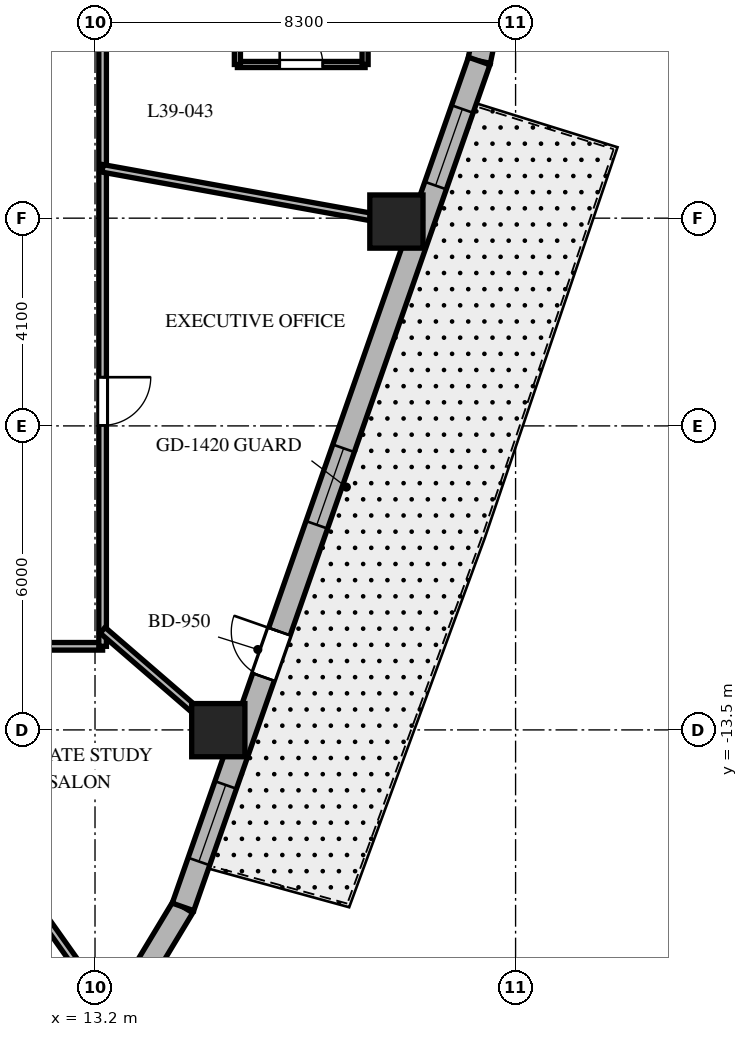
"""IFC4 building model, lengths in metres.
Left out: names, types, materials, properties, quantities, classifications, styles, units other than length and angle.
Written with IfcOpenShell. Run it as: python <this file> out.ifc"""

import sys

from ifc_helpers import new_model, si_unit, direction, frame, frame_2d, origin, origin_2d, place, context, subcontext, project, spatial, rectangle, extrude, element, fill, save


model = new_model("IFC4")
c1 = context("Model", 3, precision=1e-05, world=origin(), true_north=direction((0.0, 1.0)))
c2 = subcontext(c1, "Body", "Model", "MODEL_VIEW")
j1 = project(units=[si_unit("LENGTHUNIT", "METRE"), si_unit("PLANEANGLEUNIT", "RADIAN")], contexts=[c1])
p1 = place(None, origin())
s1 = spatial("IfcSite", under=j1, at=p1, CompositionType="ELEMENT")
p2 = place(p1, origin())
s2 = spatial("IfcBuilding", under=s1, at=p2, CompositionType="ELEMENT")
p3 = place(p2, frame((0.0, 0.0, 159.1)))
s3 = spatial("IfcBuildingStorey", under=s2, at=p3, CompositionType="ELEMENT", Elevation=159.1)
for number, where, z_axis, x_axis in (
    (1, (15.633, -13.505, 0.0), (0.0, 0.0, 1.0), (1.0, 0.0, 0.0)),
    (2, (19.148, -3.467, 0.0), (0.0, 0.0, 1.0), (1.0, 0.0, 0.0)),
):
    element("IfcColumn", number, at=place(p3, frame(where, z_axis=z_axis, x_axis=x_axis)), inside=s3, PredefinedType="COLUMN", context=c2, shape_type="SweptSolid", body=[
        extrude(rectangle(XDim=1.05, YDim=1.05, at=origin_2d()), origin(), (0.0, 0.0, 1.0), 3.7),
    ])
p4 = place(p3, frame((14.214, -18.192, 0.0), z_axis=(0.0, 0.0, 1.0), x_axis=(0.516340945502, 0.856383108193, 0.0)))
e3 = element("IfcWall", 3, at=p4, inside=s3, PredefinedType="SOLIDWALL", context=c2, shape_type="SweptSolid", body=[
    extrude(rectangle(XDim=1.4, YDim=0.45, at=frame_2d((0.7, 0.0))), origin(), (0.0, 0.0, 1.0), 3.4),
])
p5 = place(p3, frame((20.782, -0.298, 0.0), z_axis=(0.0, 0.0, 1.0), x_axis=(0.202570068411, 0.979267771033, 0.0)))
e4 = element("IfcWall", 4, at=p5, inside=s3, PredefinedType="SOLIDWALL", context=c2, shape_type="SweptSolid", body=[
    extrude(rectangle(XDim=0.909, YDim=0.45, at=frame_2d((0.454, 0.0))), origin(), (0.0, 0.0, 1.0), 3.4),
])
p6 = place(p3, frame((14.937, -16.993, 0.0), z_axis=(0.0, 0.0, 1.0), x_axis=(0.330431575061, 0.943829949834, 0.0)))
e5 = element("IfcWall", 5, at=p6, inside=s3, PredefinedType="SOLIDWALL", context=c2, shape_type="SweptSolid", body=[
    extrude(rectangle(XDim=17.689, YDim=0.45, at=frame_2d((8.844, 0.0))), origin(), (0.0, 0.0, 1.0), 3.4),
])
p7 = place(p6, frame((4.807, 0.0, 0.0)))
e6 = element("IfcOpeningElement", 6, at=p7, cuts=e5, PredefinedType="OPENING", context=c2, shape_type="SweptSolid", body=[
    extrude(rectangle(XDim=0.95, YDim=2.15, at=frame_2d((0.475, 1.075))), frame((0.0, 0.235, 0.0), z_axis=(0.0, -1.0, 0.0), x_axis=(1.0, 0.0, 0.0)), (0.0, 0.0, 1.0), 0.47),
])
p8 = place(p6, frame((0.95, 0.0, 0.8)))
e7 = element("IfcOpeningElement", 7, at=p8, cuts=e5, PredefinedType="OPENING", context=c2, shape_type="SweptSolid", body=[
    extrude(rectangle(XDim=1.6, YDim=1.75, at=frame_2d((0.8, 0.875))), frame((0.0, 0.235, 0.0), z_axis=(0.0, -1.0, 0.0), x_axis=(1.0, 0.0, 0.0)), (0.0, 0.0, 1.0), 0.47),
])
p9 = place(p6, frame((7.99, 0.0, 0.8)))
e8 = element("IfcOpeningElement", 8, at=p9, cuts=e5, PredefinedType="OPENING", context=c2, shape_type="SweptSolid", body=[
    extrude(rectangle(XDim=1.6, YDim=1.75, at=frame_2d((0.8, 0.875))), frame((0.0, 0.235, 0.0), z_axis=(0.0, -1.0, 0.0), x_axis=(1.0, 0.0, 0.0)), (0.0, 0.0, 1.0), 0.47),
])
p10 = place(p6, frame((15.084, 0.0, 0.8)))
e9 = element("IfcOpeningElement", 9, at=p10, cuts=e5, PredefinedType="OPENING", context=c2, shape_type="SweptSolid", body=[
    extrude(rectangle(XDim=1.6, YDim=1.75, at=frame_2d((0.8, 0.875))), frame((0.0, 0.235, 0.0), z_axis=(0.0, -1.0, 0.0), x_axis=(1.0, 0.0, 0.0)), (0.0, 0.0, 1.0), 0.47),
])
p11 = place(p3, frame((13.35, -11.85, 0.0), z_axis=(0.0, 0.0, 1.0), x_axis=(-1.0, 0.0, 0.0)))
e10 = element("IfcWall", 10, at=p11, inside=s3, PredefinedType="PARTITIONING", context=c2, shape_type="SweptSolid", body=[
    extrude(rectangle(XDim=26.7, YDim=0.15, at=frame_2d((13.35, 0.0))), origin(), (0.0, 0.0, 1.0), 2.84),
])
p12 = place(p11, frame((20.682, 0.0, 0.0)))
e11 = element("IfcOpeningElement", 11, at=p12, cuts=e10, PredefinedType="OPENING", context=c2, shape_type="SweptSolid", body=[
    extrude(rectangle(XDim=0.95, YDim=2.03, at=frame_2d((0.475, 1.015))), frame((0.0, 0.085, 0.0), z_axis=(0.0, -1.0, 0.0), x_axis=(1.0, 0.0, 0.0)), (0.0, 0.0, 1.0), 0.17),
])
p13 = place(p11, frame((14.708, 0.0, 0.0)))
e12 = element("IfcOpeningElement", 12, at=p13, cuts=e10, PredefinedType="OPENING", context=c2, shape_type="SweptSolid", body=[
    extrude(rectangle(XDim=0.95, YDim=2.03, at=frame_2d((0.475, 1.015))), frame((0.0, 0.085, 0.0), z_axis=(0.0, -1.0, 0.0), x_axis=(1.0, 0.0, 0.0)), (0.0, 0.0, 1.0), 0.17),
])
p14 = place(p11, frame((10.553, 0.0, 0.0)))
e13 = element("IfcOpeningElement", 13, at=p14, cuts=e10, PredefinedType="OPENING", context=c2, shape_type="SweptSolid", body=[
    extrude(rectangle(XDim=0.95, YDim=2.03, at=frame_2d((0.475, 1.015))), frame((0.0, 0.085, 0.0), z_axis=(0.0, -1.0, 0.0), x_axis=(1.0, 0.0, 0.0)), (0.0, 0.0, 1.0), 0.17),
])
p15 = place(p11, frame((6.353, 0.0, 0.0)))
e14 = element("IfcOpeningElement", 14, at=p15, cuts=e10, PredefinedType="OPENING", context=c2, shape_type="SweptSolid", body=[
    extrude(rectangle(XDim=0.9, YDim=2.03, at=frame_2d((0.45, 1.015))), frame((0.0, 0.085, 0.0), z_axis=(0.0, -1.0, 0.0), x_axis=(1.0, 0.0, 0.0)), (0.0, 0.0, 1.0), 0.17),
])
p16 = place(p11, frame((2.15, 0.0, 0.0)))
e15 = element("IfcOpeningElement", 15, at=p16, cuts=e10, PredefinedType="OPENING", context=c2, shape_type="SweptSolid", body=[
    extrude(rectangle(XDim=0.9, YDim=2.03, at=frame_2d((0.45, 1.015))), frame((0.0, 0.085, 0.0), z_axis=(0.0, -1.0, 0.0), x_axis=(1.0, 0.0, 0.0)), (0.0, 0.0, 1.0), 0.17),
])
p17 = place(p3, frame((13.35, 11.85, 0.0), z_axis=(0.0, 0.0, 1.0), x_axis=(0.0, -1.0, 0.0)))
e16 = element("IfcWall", 16, at=p17, inside=s3, PredefinedType="PARTITIONING", context=c2, shape_type="SweptSolid", body=[
    extrude(rectangle(XDim=23.7, YDim=0.15, at=frame_2d((11.85, 0.0))), origin(), (0.0, 0.0, 1.0), 2.84),
])
p18 = place(p17, frame((5.652, 0.0, 0.0)))
e17 = element("IfcOpeningElement", 17, at=p18, cuts=e16, PredefinedType="OPENING", context=c2, shape_type="SweptSolid", body=[
    extrude(rectangle(XDim=0.95, YDim=2.03, at=frame_2d((0.475, 1.015))), frame((0.0, 0.085, 0.0), z_axis=(0.0, -1.0, 0.0), x_axis=(1.0, 0.0, 0.0)), (0.0, 0.0, 1.0), 0.17),
])
p19 = place(p17, frame((1.721, 0.0, 0.0)))
e18 = element("IfcOpeningElement", 18, at=p19, cuts=e16, PredefinedType="OPENING", context=c2, shape_type="SweptSolid", body=[
    extrude(rectangle(XDim=0.9, YDim=2.03, at=frame_2d((0.45, 1.015))), frame((0.0, 0.085, 0.0), z_axis=(0.0, -1.0, 0.0), x_axis=(1.0, 0.0, 0.0)), (0.0, 0.0, 1.0), 0.17),
])
p20 = place(p17, frame((18.389, 0.0, 0.0)))
e19 = element("IfcOpeningElement", 19, at=p20, cuts=e16, PredefinedType="OPENING", context=c2, shape_type="SweptSolid", body=[
    extrude(rectangle(XDim=0.95, YDim=2.03, at=frame_2d((0.475, 1.015))), frame((0.0, 0.085, 0.0), z_axis=(0.0, -1.0, 0.0), x_axis=(1.0, 0.0, 0.0)), (0.0, 0.0, 1.0), 0.17),
])
p21 = place(p17, frame((10.751, 0.0, 0.0)))
e20 = element("IfcOpeningElement", 20, at=p21, cuts=e16, PredefinedType="OPENING", context=c2, shape_type="SweptSolid", body=[
    extrude(rectangle(XDim=0.95, YDim=2.03, at=frame_2d((0.475, 1.015))), frame((0.0, 0.085, 0.0), z_axis=(0.0, -1.0, 0.0), x_axis=(1.0, 0.0, 0.0)), (0.0, 0.0, 1.0), 0.17),
])
p22 = place(p3, frame((8.39, -11.85, 0.0), z_axis=(0.0, 0.0, 1.0), x_axis=(0.577877530264, -0.816123495566, 0.0)))
e21 = element("IfcWall", 21, at=p22, inside=s3, PredefinedType="PARTITIONING", context=c2, shape_type="SweptSolid", body=[
    extrude(rectangle(XDim=8.382, YDim=0.15, at=frame_2d((4.191, 0.0))), origin(), (0.0, 0.0, 1.0), 2.64),
])
p23 = place(p3, frame((13.35, -11.533, 0.0), z_axis=(0.0, 0.0, 1.0), x_axis=(0.756711647314, -0.65374879183, 0.0)))
e22 = element("IfcWall", 22, at=p23, inside=s3, PredefinedType="PARTITIONING", context=c2, shape_type="SweptSolid", body=[
    extrude(rectangle(XDim=3.55, YDim=0.15, at=frame_2d((1.775, 0.0))), origin(), (0.0, 0.0, 1.0), 2.64),
])
p24 = place(p3, frame((13.35, -2.417, 0.0), z_axis=(0.0, 0.0, 1.0), x_axis=(0.98399796473, -0.178179699761, 0.0)))
e23 = element("IfcWall", 23, at=p24, inside=s3, PredefinedType="PARTITIONING", context=c2, shape_type="SweptSolid", body=[
    extrude(rectangle(XDim=6.393, YDim=0.15, at=frame_2d((3.197, 0.0))), origin(), (0.0, 0.0, 1.0), 2.64),
])
p25 = place(p3, frame((16.01, -0.367, 0.0), z_axis=(0.0, 0.0, 1.0), x_axis=(1.0, 0.0, 0.0)))
e24 = element("IfcWall", 24, at=p25, inside=s3, PredefinedType="PARTITIONING", context=c2, shape_type="SweptSolid", body=[
    extrude(rectangle(XDim=2.52, YDim=0.12, at=frame_2d((1.26, 0.0))), origin(), (0.0, 0.0, 1.0), 3.4),
])
p26 = place(p25, frame((0.835, 0.0, 0.0)))
e25 = element("IfcOpeningElement", 25, at=p26, cuts=e24, PredefinedType="OPENING", context=c2, shape_type="SweptSolid", body=[
    extrude(rectangle(XDim=0.85, YDim=2.03, at=frame_2d((0.425, 1.015))), frame((0.0, 0.07, 0.0), z_axis=(0.0, -1.0, 0.0), x_axis=(1.0, 0.0, 0.0)), (0.0, 0.0, 1.0), 0.14),
])
p27 = place(p3, frame((18.53, -0.367, 0.0), z_axis=(0.0, 0.0, 1.0), x_axis=(0.0, 1.0, 0.0)))
e26 = element("IfcWall", 26, at=p27, inside=s3, PredefinedType="PARTITIONING", context=c2, shape_type="SweptSolid", body=[
    extrude(rectangle(XDim=2.68, YDim=0.12, at=frame_2d((1.34, 0.0))), origin(), (0.0, 0.0, 1.0), 2.64),
])
p28 = place(p3, frame((16.01, 2.313, 0.0), z_axis=(0.0, 0.0, 1.0), x_axis=(0.0, -1.0, 0.0)))
e27 = element("IfcWall", 27, at=p28, inside=s3, PredefinedType="PARTITIONING", context=c2, shape_type="SweptSolid", body=[
    extrude(rectangle(XDim=2.68, YDim=0.12, at=frame_2d((1.34, 0.0))), origin(), (0.0, 0.0, 1.0), 3.4),
])
p29 = place(p7, origin())
e28 = element("IfcDoor", 28, at=p29, inside=s3, OperationType="SINGLE_SWING_RIGHT", PredefinedType="DOOR", context=c2, shape_type="SweptSolid", body=[
    extrude(rectangle(XDim=0.95, YDim=2.15, at=frame_2d((0.475, 1.075))), frame((0.0, 0.025, 0.0), z_axis=(0.0, -1.0, 0.0), x_axis=(1.0, 0.0, 0.0)), (0.0, 0.0, 1.0), 0.05),
])
fill(e6, e28)
p30 = place(p8, origin())
e29 = element("IfcWindow", 29, at=p30, inside=s3, PartitioningType="SINGLE_PANEL", PredefinedType="WINDOW", context=c2, shape_type="SweptSolid", body=[
    extrude(rectangle(XDim=1.6, YDim=1.75, at=frame_2d((0.8, 0.875))), frame((0.0, 0.03, 0.0), z_axis=(0.0, -1.0, 0.0), x_axis=(1.0, 0.0, 0.0)), (0.0, 0.0, 1.0), 0.06),
])
fill(e7, e29)
p31 = place(p9, origin())
e30 = element("IfcWindow", 30, at=p31, inside=s3, PartitioningType="SINGLE_PANEL", PredefinedType="WINDOW", context=c2, shape_type="SweptSolid", body=[
    extrude(rectangle(XDim=1.6, YDim=1.75, at=frame_2d((0.8, 0.875))), frame((0.0, 0.03, 0.0), z_axis=(0.0, -1.0, 0.0), x_axis=(1.0, 0.0, 0.0)), (0.0, 0.0, 1.0), 0.06),
])
fill(e8, e30)
p32 = place(p10, origin())
e31 = element("IfcWindow", 31, at=p32, inside=s3, PartitioningType="SINGLE_PANEL", PredefinedType="WINDOW", context=c2, shape_type="SweptSolid", body=[
    extrude(rectangle(XDim=1.6, YDim=1.75, at=frame_2d((0.8, 0.875))), frame((0.0, 0.03, 0.0), z_axis=(0.0, -1.0, 0.0), x_axis=(1.0, 0.0, 0.0)), (0.0, 0.0, 1.0), 0.06),
])
fill(e9, e31)
p33 = place(p20, origin())
e32 = element("IfcDoor", 32, at=p33, inside=s3, OperationType="SINGLE_SWING_LEFT", PredefinedType="DOOR", context=c2, shape_type="SweptSolid", body=[
    extrude(rectangle(XDim=0.95, YDim=2.03, at=frame_2d((0.475, 1.015))), frame((0.0, 0.025, 0.0), z_axis=(0.0, -1.0, 0.0), x_axis=(1.0, 0.0, 0.0)), (0.0, 0.0, 1.0), 0.05),
])
fill(e19, e32)
p34 = place(p26, origin())
e33 = element("IfcDoor", 33, at=p34, inside=s3, OperationType="SINGLE_SWING_LEFT", PredefinedType="DOOR", context=c2, shape_type="SweptSolid", body=[
    extrude(rectangle(XDim=0.85, YDim=2.03, at=frame_2d((0.425, 1.015))), frame((0.0, 0.025, 0.0), z_axis=(0.0, -1.0, 0.0), x_axis=(1.0, 0.0, 0.0)), (0.0, 0.0, 1.0), 0.05),
])
fill(e25, e33)
save(model, sys.argv[1])
